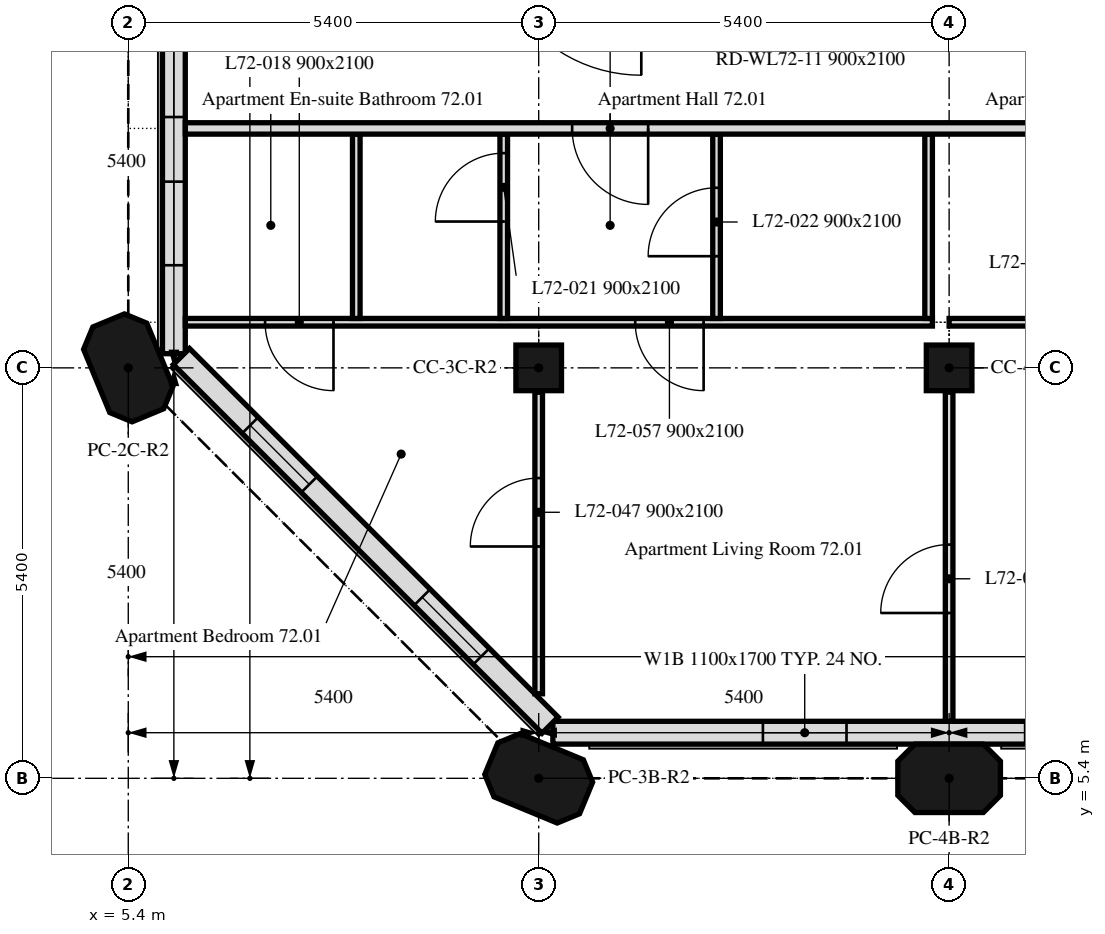
"""IFC4 building model, lengths in metres.
Left out: names, types, materials, properties, quantities, classifications, styles, units other than length and angle.
Written with IfcOpenShell. Run it as: python <this file> out.ifc"""

import sys

from ifc_helpers import new_model, si_unit, direction, frame, frame_2d, origin, origin_2d, place, context, subcontext, project, spatial, polyline, rectangle, outline, extrude, element, fill, save


model = new_model("IFC4")
c1 = context("Model", 3, precision=1e-05, world=origin(), true_north=direction((0.0, 1.0)))
c2 = subcontext(c1, "Body", "Model", "MODEL_VIEW")
j1 = project(units=[si_unit("LENGTHUNIT", "METRE"), si_unit("PLANEANGLEUNIT", "RADIAN")], contexts=[c1])
p1 = place(None, origin())
s1 = spatial("IfcSite", under=j1, at=p1, CompositionType="ELEMENT")
p2 = place(p1, origin())
s2 = spatial("IfcBuilding", under=s1, at=p2, CompositionType="ELEMENT")
p3 = place(p2, frame((0.0, 0.0, 291.7)))
s3 = spatial("IfcBuildingStorey", under=s2, at=p3, CompositionType="ELEMENT", Elevation=291.7)
for number, where, z_axis, x_axis in (
    (1, (10.8, 5.4, 0.0), (0.0, 0.0, 1.0), (-0.924, 0.383, 0.0)),
    (2, (16.2, 5.4, 0.0), (0.0, 0.0, 1.0), (1.0, 0.0, 0.0)),
    (3, (5.4, 10.8, 0.0), (0.0, 0.0, 1.0), (-0.383, 0.924, 0.0)),
):
    element("IfcColumn", number, at=place(p3, frame(where, z_axis=z_axis, x_axis=x_axis)), inside=s3, PredefinedType="COLUMN", context=c2, shape_type="SweptSolid", body=[
        extrude(outline(polyline([(-0.45, -0.45), (0.45, -0.45), (0.675, -0.225), (0.675, 0.225), (0.45, 0.45), (-0.45, 0.45), (-0.675, 0.225), (-0.675, -0.225), (-0.45, -0.45)])), origin(), (0.0, 0.0, 1.0), 3.0),
    ])
for number, where, z_axis, x_axis in (
    (4, (10.8, 10.8, 0.0), (0.0, 0.0, 1.0), (1.0, 0.0, 0.0)),
    (5, (16.2, 10.8, 0.0), (0.0, 0.0, 1.0), (1.0, 0.0, 0.0)),
):
    element("IfcColumn", number, at=place(p3, frame(where, z_axis=z_axis, x_axis=x_axis)), inside=s3, PredefinedType="COLUMN", context=c2, shape_type="SweptSolid", body=[
        extrude(rectangle(XDim=0.6, YDim=0.6, at=origin_2d()), origin(), (0.0, 0.0, 1.0), 3.0),
    ])
p4 = place(p3, frame((10.986, 6.0, 0.0), z_axis=(0.0, 0.0, 1.0), x_axis=(1.0, 0.0, 0.0)))
e6 = element("IfcWall", 6, at=p4, inside=s3, PredefinedType="SOLIDWALL", context=c2, shape_type="SweptSolid", body=[
    extrude(rectangle(XDim=32.027, YDim=0.3, at=frame_2d((16.014, 0.0))), origin(), (0.0, 0.0, 1.0), 3.0),
])
p5 = place(p4, frame((2.764, 0.0, 0.9)))
e7 = element("IfcOpeningElement", 7, at=p5, cuts=e6, PredefinedType="OPENING", context=c2, shape_type="SweptSolid", body=[
    extrude(rectangle(XDim=1.1, YDim=1.7, at=frame_2d((0.55, 0.85))), frame((0.0, 0.16, 0.0), z_axis=(0.0, -1.0, 0.0), x_axis=(1.0, 0.0, 0.0)), (0.0, 0.0, 1.0), 0.32),
])
p6 = place(p4, frame((6.214, 0.0, 0.9)))
e8 = element("IfcOpeningElement", 8, at=p6, cuts=e6, PredefinedType="OPENING", context=c2, shape_type="SweptSolid", body=[
    extrude(rectangle(XDim=3.4, YDim=1.7, at=frame_2d((1.7, 0.85))), frame((0.0, 0.16, 0.0), z_axis=(0.0, -1.0, 0.0), x_axis=(1.0, 0.0, 0.0)), (0.0, 0.0, 1.0), 0.32),
])
p7 = place(p4, frame((13.564, 0.0, 0.9)))
e9 = element("IfcOpeningElement", 9, at=p7, cuts=e6, PredefinedType="OPENING", context=c2, shape_type="SweptSolid", body=[
    extrude(rectangle(XDim=1.1, YDim=1.7, at=frame_2d((0.55, 0.85))), frame((0.0, 0.16, 0.0), z_axis=(0.0, -1.0, 0.0), x_axis=(1.0, 0.0, 0.0)), (0.0, 0.0, 1.0), 0.32),
])
p8 = place(p4, frame((17.014, 0.0, 0.9)))
e10 = element("IfcOpeningElement", 10, at=p8, cuts=e6, PredefinedType="OPENING", context=c2, shape_type="SweptSolid", body=[
    extrude(rectangle(XDim=3.4, YDim=1.7, at=frame_2d((1.7, 0.85))), frame((0.0, 0.16, 0.0), z_axis=(0.0, -1.0, 0.0), x_axis=(1.0, 0.0, 0.0)), (0.0, 0.0, 1.0), 0.32),
])
p9 = place(p4, frame((24.364, 0.0, 0.9)))
e11 = element("IfcOpeningElement", 11, at=p9, cuts=e6, PredefinedType="OPENING", context=c2, shape_type="SweptSolid", body=[
    extrude(rectangle(XDim=1.1, YDim=1.7, at=frame_2d((0.55, 0.85))), frame((0.0, 0.16, 0.0), z_axis=(0.0, -1.0, 0.0), x_axis=(1.0, 0.0, 0.0)), (0.0, 0.0, 1.0), 0.32),
])
p10 = place(p4, frame((27.814, 0.0, 0.9)))
e12 = element("IfcOpeningElement", 12, at=p10, cuts=e6, PredefinedType="OPENING", context=c2, shape_type="SweptSolid", body=[
    extrude(rectangle(XDim=3.4, YDim=1.7, at=frame_2d((1.7, 0.85))), frame((0.0, 0.16, 0.0), z_axis=(0.0, -1.0, 0.0), x_axis=(1.0, 0.0, 0.0)), (0.0, 0.0, 1.0), 0.32),
])
p11 = place(p3, frame((6.0, 16.2, 0.0), z_axis=(0.0, 0.0, 1.0), x_axis=(0.0, -1.0, 0.0)))
e13 = element("IfcWall", 13, at=p11, inside=s3, PredefinedType="SOLIDWALL", context=c2, shape_type="SweptSolid", body=[
    extrude(rectangle(XDim=5.214, YDim=0.3, at=frame_2d((2.607, 0.0))), origin(), (0.0, 0.0, 1.0), 3.0),
])
p12 = place(p11, frame((1.0, 0.0, 0.9)))
e14 = element("IfcOpeningElement", 14, at=p12, cuts=e13, PredefinedType="OPENING", context=c2, shape_type="SweptSolid", body=[
    extrude(rectangle(XDim=1.1, YDim=1.7, at=frame_2d((0.55, 0.85))), frame((0.0, 0.16, 0.0), z_axis=(0.0, -1.0, 0.0), x_axis=(1.0, 0.0, 0.0)), (0.0, 0.0, 1.0), 0.32),
])
p13 = place(p11, frame((2.95, 0.0, 0.9)))
e15 = element("IfcOpeningElement", 15, at=p13, cuts=e13, PredefinedType="OPENING", context=c2, shape_type="SweptSolid", body=[
    extrude(rectangle(XDim=1.1, YDim=1.7, at=frame_2d((0.55, 0.85))), frame((0.0, 0.16, 0.0), z_axis=(0.0, -1.0, 0.0), x_axis=(1.0, 0.0, 0.0)), (0.0, 0.0, 1.0), 0.32),
])
p14 = place(p3, frame((6.099, 10.949, 0.0), z_axis=(0.0, 0.0, 1.0), x_axis=(0.707106781187, -0.707106781187, 0.0)))
e16 = element("IfcWall", 16, at=p14, inside=s3, PredefinedType="SOLIDWALL", context=c2, shape_type="SweptSolid", body=[
    extrude(rectangle(XDim=6.86, YDim=0.3, at=frame_2d((3.43, 0.0))), origin(), (0.0, 0.0, 1.0), 3.0),
])
p15 = place(p14, frame((1.28, 0.0, 0.9)))
e17 = element("IfcOpeningElement", 17, at=p15, cuts=e16, PredefinedType="OPENING", context=c2, shape_type="SweptSolid", body=[
    extrude(rectangle(XDim=1.1, YDim=1.7, at=frame_2d((0.55, 0.85))), frame((0.0, 0.16, 0.0), z_axis=(0.0, -1.0, 0.0), x_axis=(1.0, 0.0, 0.0)), (0.0, 0.0, 1.0), 0.32),
])
p16 = place(p14, frame((4.48, 0.0, 0.9)))
e18 = element("IfcOpeningElement", 18, at=p16, cuts=e16, PredefinedType="OPENING", context=c2, shape_type="SweptSolid", body=[
    extrude(rectangle(XDim=1.1, YDim=1.7, at=frame_2d((0.55, 0.85))), frame((0.0, 0.16, 0.0), z_axis=(0.0, -1.0, 0.0), x_axis=(1.0, 0.0, 0.0)), (0.0, 0.0, 1.0), 0.32),
])
p17 = place(p3, frame((10.8, 6.512, 0.0), z_axis=(0.0, 0.0, 1.0), x_axis=(0.0, 1.0, 0.0)))
e19 = element("IfcWall", 19, at=p17, inside=s3, PredefinedType="PARTITIONING", context=c2, shape_type="SweptSolid", body=[
    extrude(rectangle(XDim=3.968, YDim=0.1, at=frame_2d((1.984, 0.0))), origin(), (0.0, 0.0, 1.0), 3.0),
])
p18 = place(p17, frame((1.938, 0.0, 0.0)))
e20 = element("IfcOpeningElement", 20, at=p18, cuts=e19, PredefinedType="OPENING", context=c2, shape_type="SweptSolid", body=[
    extrude(rectangle(XDim=0.9, YDim=2.1, at=frame_2d((0.45, 1.05))), frame((0.0, 0.05, 0.0), z_axis=(0.0, -1.0, 0.0), x_axis=(1.0, 0.0, 0.0)), (0.0, 0.0, 1.0), 0.1),
])
p19 = place(p3, frame((15.98, 11.4, 0.0), z_axis=(0.0, 0.0, 1.0), x_axis=(-1.0, 0.0, 0.0)))
e21 = element("IfcWall", 21, at=p19, inside=s3, PredefinedType="PARTITIONING", context=c2, shape_type="SweptSolid", body=[
    extrude(rectangle(XDim=9.829, YDim=0.1, at=frame_2d((4.915, 0.0))), origin(), (0.0, 0.0, 1.0), 3.0),
])
p20 = place(p19, frame((7.88, 0.0, 0.0)))
e22 = element("IfcOpeningElement", 22, at=p20, cuts=e21, PredefinedType="OPENING", context=c2, shape_type="SweptSolid", body=[
    extrude(rectangle(XDim=0.9, YDim=2.1, at=frame_2d((0.45, 1.05))), frame((0.0, 0.05, 0.0), z_axis=(0.0, -1.0, 0.0), x_axis=(1.0, 0.0, 0.0)), (0.0, 0.0, 1.0), 0.1),
])
p21 = place(p19, frame((3.01, 0.0, 0.0)))
e23 = element("IfcOpeningElement", 23, at=p21, cuts=e21, PredefinedType="OPENING", context=c2, shape_type="SweptSolid", body=[
    extrude(rectangle(XDim=0.9, YDim=2.1, at=frame_2d((0.45, 1.05))), frame((0.0, 0.05, 0.0), z_axis=(0.0, -1.0, 0.0), x_axis=(1.0, 0.0, 0.0)), (0.0, 0.0, 1.0), 0.1),
])
p22 = place(p3, frame((16.2, 6.151, 0.0), z_axis=(0.0, 0.0, 1.0), x_axis=(0.0, 1.0, 0.0)))
e24 = element("IfcWall", 24, at=p22, inside=s3, PredefinedType="PARTITIONING", context=c2, shape_type="SweptSolid", body=[
    extrude(rectangle(XDim=4.329, YDim=0.1, at=frame_2d((2.165, 0.0))), origin(), (0.0, 0.0, 1.0), 3.0),
])
p23 = place(p22, frame((1.424, 0.0, 0.0)))
e25 = element("IfcOpeningElement", 25, at=p23, cuts=e24, PredefinedType="OPENING", context=c2, shape_type="SweptSolid", body=[
    extrude(rectangle(XDim=0.9, YDim=2.1, at=frame_2d((0.45, 1.05))), frame((0.0, 0.05, 0.0), z_axis=(0.0, -1.0, 0.0), x_axis=(1.0, 0.0, 0.0)), (0.0, 0.0, 1.0), 0.1),
])
p24 = place(p3, frame((37.8, 11.4, 0.0), z_axis=(0.0, 0.0, 1.0), x_axis=(-1.0, 0.0, 0.0)))
e26 = element("IfcWall", 26, at=p24, inside=s3, PredefinedType="PARTITIONING", context=c2, shape_type="SweptSolid", body=[
    extrude(rectangle(XDim=21.6, YDim=0.1, at=frame_2d((10.8, 0.0))), origin(), (0.0, 0.0, 1.0), 3.0),
])
p25 = place(p24, frame((18.87, 0.0, 0.0)))
e27 = element("IfcOpeningElement", 27, at=p25, cuts=e26, PredefinedType="OPENING", context=c2, shape_type="SweptSolid", body=[
    extrude(rectangle(XDim=0.9, YDim=2.1, at=frame_2d((0.45, 1.05))), frame((0.0, 0.05, 0.0), z_axis=(0.0, -1.0, 0.0), x_axis=(1.0, 0.0, 0.0)), (0.0, 0.0, 1.0), 0.1),
])
p26 = place(p24, frame((17.5, 0.0, 0.0)))
e28 = element("IfcOpeningElement", 28, at=p26, cuts=e26, PredefinedType="OPENING", context=c2, shape_type="SweptSolid", body=[
    extrude(rectangle(XDim=0.9, YDim=2.1, at=frame_2d((0.45, 1.05))), frame((0.0, 0.05, 0.0), z_axis=(0.0, -1.0, 0.0), x_axis=(1.0, 0.0, 0.0)), (0.0, 0.0, 1.0), 0.1),
])
p27 = place(p24, frame((6.917, 0.0, 0.0)))
e29 = element("IfcOpeningElement", 29, at=p27, cuts=e26, PredefinedType="OPENING", context=c2, shape_type="SweptSolid", body=[
    extrude(rectangle(XDim=0.9, YDim=2.1, at=frame_2d((0.45, 1.05))), frame((0.0, 0.05, 0.0), z_axis=(0.0, -1.0, 0.0), x_axis=(1.0, 0.0, 0.0)), (0.0, 0.0, 1.0), 0.1),
])
p28 = place(p24, frame((3.15, 0.0, 0.0)))
e30 = element("IfcOpeningElement", 30, at=p28, cuts=e26, PredefinedType="OPENING", context=c2, shape_type="SweptSolid", body=[
    extrude(rectangle(XDim=0.9, YDim=2.1, at=frame_2d((0.45, 1.05))), frame((0.0, 0.05, 0.0), z_axis=(0.0, -1.0, 0.0), x_axis=(1.0, 0.0, 0.0)), (0.0, 0.0, 1.0), 0.1),
])
p29 = place(p24, frame((14.158, 0.0, 0.0)))
e31 = element("IfcOpeningElement", 31, at=p29, cuts=e26, PredefinedType="OPENING", context=c2, shape_type="SweptSolid", body=[
    extrude(rectangle(XDim=0.9, YDim=2.1, at=frame_2d((0.45, 1.05))), frame((0.0, 0.05, 0.0), z_axis=(0.0, -1.0, 0.0), x_axis=(1.0, 0.0, 0.0)), (0.0, 0.0, 1.0), 0.1),
])
p30 = place(p24, frame((12.788, 0.0, 0.0)))
e32 = element("IfcOpeningElement", 32, at=p30, cuts=e26, PredefinedType="OPENING", context=c2, shape_type="SweptSolid", body=[
    extrude(rectangle(XDim=0.9, YDim=2.1, at=frame_2d((0.45, 1.05))), frame((0.0, 0.05, 0.0), z_axis=(0.0, -1.0, 0.0), x_axis=(1.0, 0.0, 0.0)), (0.0, 0.0, 1.0), 0.1),
])
p31 = place(p3, frame((8.4, 11.45, 0.0), z_axis=(0.0, 0.0, 1.0), x_axis=(0.0, 1.0, 0.0)))
e33 = element("IfcWall", 33, at=p31, inside=s3, PredefinedType="PARTITIONING", context=c2, shape_type="SweptSolid", body=[
    extrude(rectangle(XDim=2.425, YDim=0.1, at=frame_2d((1.212, 0.0))), origin(), (0.0, 0.0, 1.0), 3.0),
])
p32 = place(p3, frame((10.34, 11.45, 0.0), z_axis=(0.0, 0.0, 1.0), x_axis=(0.0, 1.0, 0.0)))
e34 = element("IfcWall", 34, at=p32, inside=s3, PredefinedType="PARTITIONING", context=c2, shape_type="SweptSolid", body=[
    extrude(rectangle(XDim=2.425, YDim=0.1, at=frame_2d((1.212, 0.0))), origin(), (0.0, 0.0, 1.0), 3.0),
])
p33 = place(p32, frame((1.275, 0.0, 0.0)))
e35 = element("IfcOpeningElement", 35, at=p33, cuts=e34, PredefinedType="OPENING", context=c2, shape_type="SweptSolid", body=[
    extrude(rectangle(XDim=0.9, YDim=2.1, at=frame_2d((0.45, 1.05))), frame((0.0, 0.05, 0.0), z_axis=(0.0, -1.0, 0.0), x_axis=(1.0, 0.0, 0.0)), (0.0, 0.0, 1.0), 0.1),
])
p34 = place(p3, frame((13.14, 11.45, 0.0), z_axis=(0.0, 0.0, 1.0), x_axis=(0.0, 1.0, 0.0)))
e36 = element("IfcWall", 36, at=p34, inside=s3, PredefinedType="PARTITIONING", context=c2, shape_type="SweptSolid", body=[
    extrude(rectangle(XDim=2.425, YDim=0.1, at=frame_2d((1.212, 0.0))), origin(), (0.0, 0.0, 1.0), 3.0),
])
p35 = place(p34, frame((0.819, 0.0, 0.0)))
e37 = element("IfcOpeningElement", 37, at=p35, cuts=e36, PredefinedType="OPENING", context=c2, shape_type="SweptSolid", body=[
    extrude(rectangle(XDim=0.9, YDim=2.1, at=frame_2d((0.45, 1.05))), frame((0.0, 0.05, 0.0), z_axis=(0.0, -1.0, 0.0), x_axis=(1.0, 0.0, 0.0)), (0.0, 0.0, 1.0), 0.1),
])
p36 = place(p3, frame((15.93, 11.45, 0.0), z_axis=(0.0, 0.0, 1.0), x_axis=(0.0, 1.0, 0.0)))
e38 = element("IfcWall", 38, at=p36, inside=s3, PredefinedType="PARTITIONING", context=c2, shape_type="SweptSolid", body=[
    extrude(rectangle(XDim=2.425, YDim=0.1, at=frame_2d((1.212, 0.0))), origin(), (0.0, 0.0, 1.0), 3.0),
])
p37 = place(p3, frame((47.849, 13.95, 0.0), z_axis=(0.0, 0.0, 1.0), x_axis=(-1.0, 0.0, 0.0)))
e39 = element("IfcWall", 39, at=p37, inside=s3, PredefinedType="PARTITIONING", context=c2, shape_type="SweptSolid", body=[
    extrude(rectangle(XDim=41.698, YDim=0.15, at=frame_2d((20.849, 0.0))), origin(), (0.0, 0.0, 1.0), 3.0),
])
p38 = place(p37, frame((35.609, 0.0, 0.0)))
e40 = element("IfcOpeningElement", 40, at=p38, cuts=e39, PredefinedType="OPENING", context=c2, shape_type="SweptSolid", body=[
    extrude(rectangle(XDim=1.0, YDim=2.1, at=frame_2d((0.5, 1.05))), frame((0.0, 0.075, 0.0), z_axis=(0.0, -1.0, 0.0), x_axis=(1.0, 0.0, 0.0)), (0.0, 0.0, 1.0), 0.15),
])
p39 = place(p37, frame((22.354, 0.0, 0.0)))
e41 = element("IfcOpeningElement", 41, at=p39, cuts=e39, PredefinedType="OPENING", context=c2, shape_type="SweptSolid", body=[
    extrude(rectangle(XDim=1.0, YDim=2.1, at=frame_2d((0.5, 1.05))), frame((0.0, 0.075, 0.0), z_axis=(0.0, -1.0, 0.0), x_axis=(1.0, 0.0, 0.0)), (0.0, 0.0, 1.0), 0.15),
])
p40 = place(p37, frame((8.049, 0.0, 0.0)))
e42 = element("IfcOpeningElement", 42, at=p40, cuts=e39, PredefinedType="OPENING", context=c2, shape_type="SweptSolid", body=[
    extrude(rectangle(XDim=1.0, YDim=2.1, at=frame_2d((0.5, 1.05))), frame((0.0, 0.075, 0.0), z_axis=(0.0, -1.0, 0.0), x_axis=(1.0, 0.0, 0.0)), (0.0, 0.0, 1.0), 0.15),
])
p41 = place(p5, origin())
e43 = element("IfcWindow", 43, at=p41, inside=s3, PartitioningType="SINGLE_PANEL", PredefinedType="WINDOW", context=c2, shape_type="SweptSolid", body=[
    extrude(rectangle(XDim=1.1, YDim=1.7, at=frame_2d((0.55, 0.85))), frame((0.0, 0.03, 0.0), z_axis=(0.0, -1.0, 0.0), x_axis=(1.0, 0.0, 0.0)), (0.0, 0.0, 1.0), 0.06),
])
fill(e7, e43)
p42 = place(p12, origin())
e44 = element("IfcWindow", 44, at=p42, inside=s3, PartitioningType="SINGLE_PANEL", PredefinedType="WINDOW", context=c2, shape_type="SweptSolid", body=[
    extrude(rectangle(XDim=1.1, YDim=1.7, at=frame_2d((0.55, 0.85))), frame((0.0, 0.03, 0.0), z_axis=(0.0, -1.0, 0.0), x_axis=(1.0, 0.0, 0.0)), (0.0, 0.0, 1.0), 0.06),
])
fill(e14, e44)
p43 = place(p13, origin())
e45 = element("IfcWindow", 45, at=p43, inside=s3, PartitioningType="SINGLE_PANEL", PredefinedType="WINDOW", context=c2, shape_type="SweptSolid", body=[
    extrude(rectangle(XDim=1.1, YDim=1.7, at=frame_2d((0.55, 0.85))), frame((0.0, 0.03, 0.0), z_axis=(0.0, -1.0, 0.0), x_axis=(1.0, 0.0, 0.0)), (0.0, 0.0, 1.0), 0.06),
])
fill(e15, e45)
p44 = place(p15, origin())
e46 = element("IfcWindow", 46, at=p44, inside=s3, PartitioningType="SINGLE_PANEL", PredefinedType="WINDOW", context=c2, shape_type="SweptSolid", body=[
    extrude(rectangle(XDim=1.1, YDim=1.7, at=frame_2d((0.55, 0.85))), frame((0.0, 0.03, 0.0), z_axis=(0.0, -1.0, 0.0), x_axis=(1.0, 0.0, 0.0)), (0.0, 0.0, 1.0), 0.06),
])
fill(e17, e46)
p45 = place(p16, origin())
e47 = element("IfcWindow", 47, at=p45, inside=s3, PartitioningType="SINGLE_PANEL", PredefinedType="WINDOW", context=c2, shape_type="SweptSolid", body=[
    extrude(rectangle(XDim=1.1, YDim=1.7, at=frame_2d((0.55, 0.85))), frame((0.0, 0.03, 0.0), z_axis=(0.0, -1.0, 0.0), x_axis=(1.0, 0.0, 0.0)), (0.0, 0.0, 1.0), 0.06),
])
fill(e18, e47)
p46 = place(p20, origin())
e48 = element("IfcDoor", 48, at=p46, inside=s3, OperationType="SINGLE_SWING_LEFT", PredefinedType="DOOR", context=c2, shape_type="SweptSolid", body=[
    extrude(rectangle(XDim=0.9, YDim=2.1, at=frame_2d((0.45, 1.05))), frame((0.0, 0.025, 0.0), z_axis=(0.0, -1.0, 0.0), x_axis=(1.0, 0.0, 0.0)), (0.0, 0.0, 1.0), 0.05),
])
fill(e22, e48)
p47 = place(p33, origin())
e49 = element("IfcDoor", 49, at=p47, inside=s3, OperationType="SINGLE_SWING_RIGHT", PredefinedType="DOOR", context=c2, shape_type="SweptSolid", body=[
    extrude(rectangle(XDim=0.9, YDim=2.1, at=frame_2d((0.45, 1.05))), frame((0.0, 0.025, 0.0), z_axis=(0.0, -1.0, 0.0), x_axis=(1.0, 0.0, 0.0)), (0.0, 0.0, 1.0), 0.05),
])
fill(e35, e49)
p48 = place(p35, origin())
e50 = element("IfcDoor", 50, at=p48, inside=s3, OperationType="SINGLE_SWING_LEFT", PredefinedType="DOOR", context=c2, shape_type="SweptSolid", body=[
    extrude(rectangle(XDim=0.9, YDim=2.1, at=frame_2d((0.45, 1.05))), frame((0.0, 0.025, 0.0), z_axis=(0.0, -1.0, 0.0), x_axis=(1.0, 0.0, 0.0)), (0.0, 0.0, 1.0), 0.05),
])
fill(e37, e50)
p49 = place(p18, origin())
e51 = element("IfcDoor", 51, at=p49, inside=s3, OperationType="SINGLE_SWING_LEFT", PredefinedType="DOOR", context=c2, shape_type="SweptSolid", body=[
    extrude(rectangle(XDim=0.9, YDim=2.1, at=frame_2d((0.45, 1.05))), frame((0.0, 0.025, 0.0), z_axis=(0.0, -1.0, 0.0), x_axis=(1.0, 0.0, 0.0)), (0.0, 0.0, 1.0), 0.05),
])
fill(e20, e51)
p50 = place(p23, origin())
e52 = element("IfcDoor", 52, at=p50, inside=s3, OperationType="SINGLE_SWING_RIGHT", PredefinedType="DOOR", context=c2, shape_type="SweptSolid", body=[
    extrude(rectangle(XDim=0.9, YDim=2.1, at=frame_2d((0.45, 1.05))), frame((0.0, 0.025, 0.0), z_axis=(0.0, -1.0, 0.0), x_axis=(1.0, 0.0, 0.0)), (0.0, 0.0, 1.0), 0.05),
])
fill(e25, e52)
p51 = place(p21, origin())
e53 = element("IfcDoor", 53, at=p51, inside=s3, OperationType="SINGLE_SWING_LEFT", PredefinedType="DOOR", context=c2, shape_type="SweptSolid", body=[
    extrude(rectangle(XDim=0.9, YDim=2.1, at=frame_2d((0.45, 1.05))), frame((0.0, 0.025, 0.0), z_axis=(0.0, -1.0, 0.0), x_axis=(1.0, 0.0, 0.0)), (0.0, 0.0, 1.0), 0.05),
])
fill(e23, e53)
p52 = place(p38, origin())
e54 = element("IfcDoor", 54, at=p52, inside=s3, OperationType="SINGLE_SWING_RIGHT", PredefinedType="DOOR", context=c2, shape_type="SweptSolid", body=[
    extrude(rectangle(XDim=1.0, YDim=2.1, at=frame_2d((0.5, 1.05))), frame((0.0, 0.025, 0.0), z_axis=(0.0, -1.0, 0.0), x_axis=(1.0, 0.0, 0.0)), (0.0, 0.0, 1.0), 0.05),
])
fill(e40, e54)
save(model, sys.argv[1])
